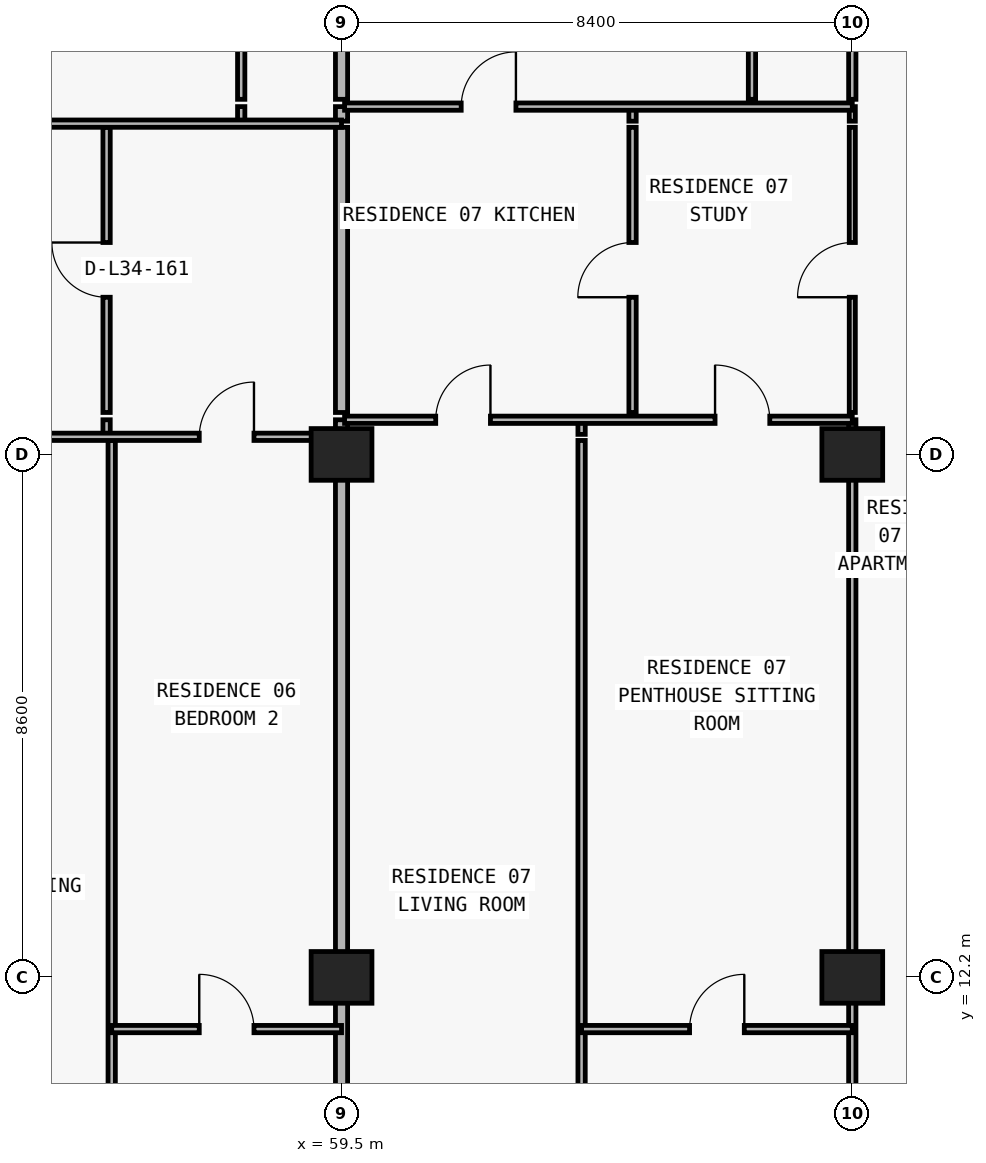
"""IFC4 building model, lengths in metres.
Left out: names, types, materials, properties, quantities, classifications, styles, units other than length and angle.
Written with IfcOpenShell. Run it as: python <this file> out.ifc"""

import sys

from ifc_helpers import new_model, si_unit, direction, frame, frame_2d, origin, origin_2d, place, context, subcontext, project, spatial, rectangle, extrude, element, fill, save


model = new_model("IFC4")
c1 = context("Model", 3, precision=1e-05, world=origin(), true_north=direction((0.0, 1.0)))
c2 = subcontext(c1, "Body", "Model", "MODEL_VIEW")
j1 = project(units=[si_unit("LENGTHUNIT", "METRE"), si_unit("PLANEANGLEUNIT", "RADIAN")], contexts=[c1])
p1 = place(None, origin())
s1 = spatial("IfcSite", under=j1, at=p1, CompositionType="ELEMENT")
p2 = place(p1, origin())
s2 = spatial("IfcBuilding", under=s1, at=p2, CompositionType="ELEMENT")
p3 = place(p2, frame((0.0, 0.0, 125.7)))
s3 = spatial("IfcBuildingStorey", under=s2, at=p3, CompositionType="ELEMENT", Elevation=125.7)
for number, where, z_axis, x_axis in (
    (1, (59.5, 12.2, 0.0), (0.0, 0.0, 1.0), (1.0, 0.0, 0.0)),
    (2, (67.9, 12.2, 0.0), (0.0, 0.0, 1.0), (1.0, 0.0, 0.0)),
    (3, (59.5, 20.8, 0.0), (0.0, 0.0, 1.0), (1.0, 0.0, 0.0)),
    (4, (67.9, 20.8, 0.0), (0.0, 0.0, 1.0), (1.0, 0.0, 0.0)),
):
    element("IfcColumn", number, at=place(p3, frame(where, z_axis=z_axis, x_axis=x_axis)), inside=s3, PredefinedType="COLUMN", context=c2, shape_type="SweptSolid", body=[
        extrude(rectangle(XDim=1.0, YDim=0.85, at=origin_2d()), origin(), (0.0, 0.0, 1.0), 3.05),
    ])
p4 = place(p3, frame((55.636, 21.13, 0.0), z_axis=(0.0, 0.0, 1.0), x_axis=(0.0, 1.0, 0.0)))
e5 = element("IfcWall", 5, at=p4, inside=s3, PredefinedType="PARTITIONING", context=c2, shape_type="SweptSolid", body=[
    extrude(rectangle(XDim=0.24, YDim=0.12, at=frame_2d((0.12, 0.0))), origin(), (0.0, 0.0, 1.0), 3.05),
])
p5 = place(p3, frame((55.636, 21.49, 0.0), z_axis=(0.0, 0.0, 1.0), x_axis=(0.0, 1.0, 0.0)))
e6 = element("IfcWall", 6, at=p5, inside=s3, PredefinedType="PARTITIONING", context=c2, shape_type="SweptSolid", body=[
    extrude(rectangle(XDim=4.69, YDim=0.12, at=frame_2d((2.345, 0.0))), origin(), (0.0, 0.0, 1.0), 3.05),
])
p6 = place(p5, frame((1.895, 0.0, 0.0)))
e7 = element("IfcOpeningElement", 7, at=p6, cuts=e6, PredefinedType="OPENING", context=c2, shape_type="SweptSolid", body=[
    extrude(rectangle(XDim=0.9, YDim=2.15, at=frame_2d((0.45, 1.075))), frame((0.0, 0.07, 0.0), z_axis=(0.0, -1.0, 0.0), x_axis=(1.0, 0.0, 0.0)), (0.0, 0.0, 1.0), 0.14),
])
p7 = place(p3, frame((55.72, 8.84, 0.0), z_axis=(0.0, 0.0, 1.0), x_axis=(0.0, 1.0, 0.0)))
e8 = element("IfcWall", 8, at=p7, inside=s3, PredefinedType="PARTITIONING", context=c2, shape_type="SweptSolid", body=[
    extrude(rectangle(XDim=12.19, YDim=0.12, at=frame_2d((6.095, 0.0))), origin(), (0.0, 0.0, 1.0), 3.05),
])
p8 = place(p3, frame((57.85, 26.28, 0.0), z_axis=(0.0, 0.0, 1.0), x_axis=(0.0, 1.0, 0.0)))
e9 = element("IfcWall", 9, at=p8, inside=s3, PredefinedType="PARTITIONING", context=c2, shape_type="SweptSolid", body=[
    extrude(rectangle(XDim=0.24, YDim=0.12, at=frame_2d((0.12, 0.0))), origin(), (0.0, 0.0, 1.0), 3.05),
])
p9 = place(p3, frame((57.85, 26.64, 0.0), z_axis=(0.0, 0.0, 1.0), x_axis=(0.0, 1.0, 0.0)))
e10 = element("IfcWall", 10, at=p9, inside=s3, PredefinedType="PARTITIONING", context=c2, shape_type="SweptSolid", body=[
    extrude(rectangle(XDim=8.06, YDim=0.12, at=frame_2d((4.03, 0.0))), origin(), (0.0, 0.0, 1.0), 3.05),
])
p10 = place(p9, frame((3.755, 0.0, 0.0)))
e11 = element("IfcOpeningElement", 11, at=p10, cuts=e10, PredefinedType="OPENING", context=c2, shape_type="SweptSolid", body=[
    extrude(rectangle(XDim=0.85, YDim=2.1, at=frame_2d((0.425, 1.05))), frame((0.0, 0.07, 0.0), z_axis=(0.0, -1.0, 0.0), x_axis=(1.0, 0.0, 0.0)), (0.0, 0.0, 1.0), 0.14),
])
p11 = place(p3, frame((59.5, 8.84, 0.0), z_axis=(0.0, 0.0, 1.0), x_axis=(0.0, 1.0, 0.0)))
e12 = element("IfcWall", 12, at=p11, inside=s3, PredefinedType="PARTITIONING", context=c2, shape_type="SweptSolid", body=[
    extrude(rectangle(XDim=12.19, YDim=0.2, at=frame_2d((6.095, 0.0))), origin(), (0.0, 0.0, 1.0), 2.174),
])
p12 = place(p3, frame((59.5, 21.13, 0.0), z_axis=(0.0, 0.0, 1.0), x_axis=(0.0, 1.0, 0.0)))
e13 = element("IfcWall", 13, at=p12, inside=s3, PredefinedType="PARTITIONING", context=c2, shape_type="SweptSolid", body=[
    extrude(rectangle(XDim=0.24, YDim=0.2, at=frame_2d((0.12, 0.0))), origin(), (0.0, 0.0, 1.0), 2.174),
])
p13 = place(p3, frame((59.5, 21.49, 0.0), z_axis=(0.0, 0.0, 1.0), x_axis=(0.0, 1.0, 0.0)))
e14 = element("IfcWall", 14, at=p13, inside=s3, PredefinedType="PARTITIONING", context=c2, shape_type="SweptSolid", body=[
    extrude(rectangle(XDim=4.69, YDim=0.2, at=frame_2d((2.345, 0.0))), origin(), (0.0, 0.0, 1.0), 2.174),
])
p14 = place(p3, frame((59.5, 26.28, 0.0), z_axis=(0.0, 0.0, 1.0), x_axis=(0.0, 1.0, 0.0)))
e15 = element("IfcWall", 15, at=p14, inside=s3, PredefinedType="PARTITIONING", context=c2, shape_type="SweptSolid", body=[
    extrude(rectangle(XDim=0.24, YDim=0.2, at=frame_2d((0.12, 0.0))), origin(), (0.0, 0.0, 1.0), 2.174),
])
p15 = place(p3, frame((59.5, 26.64, 0.0), z_axis=(0.0, 0.0, 1.0), x_axis=(0.0, 1.0, 0.0)))
e16 = element("IfcWall", 16, at=p15, inside=s3, PredefinedType="PARTITIONING", context=c2, shape_type="SweptSolid", body=[
    extrude(rectangle(XDim=8.06, YDim=0.2, at=frame_2d((4.03, 0.0))), origin(), (0.0, 0.0, 1.0), 2.174),
])
p16 = place(p3, frame((63.448, 8.84, 0.0), z_axis=(0.0, 0.0, 1.0), x_axis=(0.0, 1.0, 0.0)))
e17 = element("IfcWall", 17, at=p16, inside=s3, PredefinedType="PARTITIONING", context=c2, shape_type="SweptSolid", body=[
    extrude(rectangle(XDim=12.19, YDim=0.12, at=frame_2d((6.095, 0.0))), origin(), (0.0, 0.0, 1.0), 3.05),
])
p17 = place(p3, frame((63.448, 21.13, 0.0), z_axis=(0.0, 0.0, 1.0), x_axis=(0.0, 1.0, 0.0)))
e18 = element("IfcWall", 18, at=p17, inside=s3, PredefinedType="PARTITIONING", context=c2, shape_type="SweptSolid", body=[
    extrude(rectangle(XDim=0.24, YDim=0.12, at=frame_2d((0.12, 0.0))), origin(), (0.0, 0.0, 1.0), 3.05),
])
p18 = place(p3, frame((64.286, 21.49, 0.0), z_axis=(0.0, 0.0, 1.0), x_axis=(0.0, 1.0, 0.0)))
e19 = element("IfcWall", 19, at=p18, inside=s3, PredefinedType="PARTITIONING", context=c2, shape_type="SweptSolid", body=[
    extrude(rectangle(XDim=4.69, YDim=0.12, at=frame_2d((2.345, 0.0))), origin(), (0.0, 0.0, 1.0), 3.05),
])
p19 = place(p18, frame((1.895, 0.0, 0.0)))
e20 = element("IfcOpeningElement", 20, at=p19, cuts=e19, PredefinedType="OPENING", context=c2, shape_type="SweptSolid", body=[
    extrude(rectangle(XDim=0.9, YDim=2.15, at=frame_2d((0.45, 1.075))), frame((0.0, 0.07, 0.0), z_axis=(0.0, -1.0, 0.0), x_axis=(1.0, 0.0, 0.0)), (0.0, 0.0, 1.0), 0.14),
])
p20 = place(p3, frame((64.286, 26.28, 0.0), z_axis=(0.0, 0.0, 1.0), x_axis=(0.0, 1.0, 0.0)))
e21 = element("IfcWall", 21, at=p20, inside=s3, PredefinedType="PARTITIONING", context=c2, shape_type="SweptSolid", body=[
    extrude(rectangle(XDim=0.24, YDim=0.12, at=frame_2d((0.12, 0.0))), origin(), (0.0, 0.0, 1.0), 3.05),
])
p21 = place(p3, frame((66.25, 26.64, 0.0), z_axis=(0.0, 0.0, 1.0), x_axis=(0.0, 1.0, 0.0)))
e22 = element("IfcWall", 22, at=p21, inside=s3, PredefinedType="PARTITIONING", context=c2, shape_type="SweptSolid", body=[
    extrude(rectangle(XDim=8.06, YDim=0.12, at=frame_2d((4.03, 0.0))), origin(), (0.0, 0.0, 1.0), 3.05),
])
p22 = place(p21, frame((3.755, 0.0, 0.0)))
e23 = element("IfcOpeningElement", 23, at=p22, cuts=e22, PredefinedType="OPENING", context=c2, shape_type="SweptSolid", body=[
    extrude(rectangle(XDim=0.85, YDim=2.1, at=frame_2d((0.425, 1.05))), frame((0.0, 0.07, 0.0), z_axis=(0.0, -1.0, 0.0), x_axis=(1.0, 0.0, 0.0)), (0.0, 0.0, 1.0), 0.14),
])
p23 = place(p3, frame((67.9, 8.84, 0.0), z_axis=(0.0, 0.0, 1.0), x_axis=(0.0, 1.0, 0.0)))
e24 = element("IfcWall", 24, at=p23, inside=s3, PredefinedType="PARTITIONING", context=c2, shape_type="SweptSolid", body=[
    extrude(rectangle(XDim=12.19, YDim=0.12, at=frame_2d((6.095, 0.0))), origin(), (0.0, 0.0, 1.0), 2.174),
])
p24 = place(p3, frame((67.9, 21.13, 0.0), z_axis=(0.0, 0.0, 1.0), x_axis=(0.0, 1.0, 0.0)))
e25 = element("IfcWall", 25, at=p24, inside=s3, PredefinedType="PARTITIONING", context=c2, shape_type="SweptSolid", body=[
    extrude(rectangle(XDim=0.24, YDim=0.12, at=frame_2d((0.12, 0.0))), origin(), (0.0, 0.0, 1.0), 2.174),
])
p25 = place(p3, frame((67.9, 21.49, 0.0), z_axis=(0.0, 0.0, 1.0), x_axis=(0.0, 1.0, 0.0)))
e26 = element("IfcWall", 26, at=p25, inside=s3, PredefinedType="MOVABLE", context=c2, shape_type="SweptSolid", body=[
    extrude(rectangle(XDim=4.69, YDim=0.1, at=frame_2d((2.345, 0.0))), origin(), (0.0, 0.0, 1.0), 2.174),
])
p26 = place(p25, frame((1.895, 0.0, 0.0)))
e27 = element("IfcOpeningElement", 27, at=p26, cuts=e26, PredefinedType="OPENING", context=c2, shape_type="SweptSolid", body=[
    extrude(rectangle(XDim=0.9, YDim=2.124, at=frame_2d((0.45, 1.062))), frame((0.0, 0.06, 0.0), z_axis=(0.0, -1.0, 0.0), x_axis=(1.0, 0.0, 0.0)), (0.0, 0.0, 1.0), 0.12),
])
p27 = place(p3, frame((67.9, 26.28, 0.0), z_axis=(0.0, 0.0, 1.0), x_axis=(0.0, 1.0, 0.0)))
e28 = element("IfcWall", 28, at=p27, inside=s3, PredefinedType="MOVABLE", context=c2, shape_type="SweptSolid", body=[
    extrude(rectangle(XDim=0.24, YDim=0.1, at=frame_2d((0.12, 0.0))), origin(), (0.0, 0.0, 1.0), 2.174),
])
p28 = place(p3, frame((67.9, 26.64, 0.0), z_axis=(0.0, 0.0, 1.0), x_axis=(0.0, 1.0, 0.0)))
e29 = element("IfcWall", 29, at=p28, inside=s3, PredefinedType="PARTITIONING", context=c2, shape_type="SweptSolid", body=[
    extrude(rectangle(XDim=8.06, YDim=0.12, at=frame_2d((4.03, 0.0))), origin(), (0.0, 0.0, 1.0), 2.174),
])
p29 = place(p3, frame((55.72, 11.35, 0.0), z_axis=(0.0, 0.0, 1.0), x_axis=(1.0, 0.0, 0.0)))
e30 = element("IfcWall", 30, at=p29, inside=s3, PredefinedType="PARTITIONING", context=c2, shape_type="SweptSolid", body=[
    extrude(rectangle(XDim=3.78, YDim=0.12, at=frame_2d((1.89, 0.0))), origin(), (0.0, 0.0, 1.0), 3.05),
])
p30 = place(p29, frame((1.44, 0.0, 0.0)))
e31 = element("IfcOpeningElement", 31, at=p30, cuts=e30, PredefinedType="OPENING", context=c2, shape_type="SweptSolid", body=[
    extrude(rectangle(XDim=0.9, YDim=2.15, at=frame_2d((0.45, 1.075))), frame((0.0, 0.07, 0.0), z_axis=(0.0, -1.0, 0.0), x_axis=(1.0, 0.0, 0.0)), (0.0, 0.0, 1.0), 0.14),
])
p31 = place(p3, frame((63.448, 11.35, 0.0), z_axis=(0.0, 0.0, 1.0), x_axis=(1.0, 0.0, 0.0)))
e32 = element("IfcWall", 32, at=p31, inside=s3, PredefinedType="PARTITIONING", context=c2, shape_type="SweptSolid", body=[
    extrude(rectangle(XDim=4.452, YDim=0.12, at=frame_2d((2.226, 0.0))), origin(), (0.0, 0.0, 1.0), 3.05),
])
p32 = place(p31, frame((1.776, 0.0, 0.0)))
e33 = element("IfcOpeningElement", 33, at=p32, cuts=e32, PredefinedType="OPENING", context=c2, shape_type="SweptSolid", body=[
    extrude(rectangle(XDim=0.9, YDim=2.15, at=frame_2d((0.45, 1.075))), frame((0.0, 0.07, 0.0), z_axis=(0.0, -1.0, 0.0), x_axis=(1.0, 0.0, 0.0)), (0.0, 0.0, 1.0), 0.14),
])
p33 = place(p3, frame((51.32, 21.09, 0.0), z_axis=(0.0, 0.0, 1.0), x_axis=(1.0, 0.0, 0.0)))
e34 = element("IfcWall", 34, at=p33, inside=s3, PredefinedType="PARTITIONING", context=c2, shape_type="SweptSolid", body=[
    extrude(rectangle(XDim=8.18, YDim=0.12, at=frame_2d((4.09, 0.0))), origin(), (0.0, 0.0, 1.0), 2.174),
])
p34 = place(p33, frame((1.708, 0.0, 0.0)))
e35 = element("IfcOpeningElement", 35, at=p34, cuts=e34, PredefinedType="OPENING", context=c2, shape_type="SweptSolid", body=[
    extrude(rectangle(XDim=0.9, YDim=2.124, at=frame_2d((0.45, 1.062))), frame((0.0, 0.07, 0.0), z_axis=(0.0, -1.0, 0.0), x_axis=(1.0, 0.0, 0.0)), (0.0, 0.0, 1.0), 0.14),
])
p35 = place(p33, frame((5.84, 0.0, 0.0)))
e36 = element("IfcOpeningElement", 36, at=p35, cuts=e34, PredefinedType="OPENING", context=c2, shape_type="SweptSolid", body=[
    extrude(rectangle(XDim=0.9, YDim=2.124, at=frame_2d((0.45, 1.062))), frame((0.0, 0.07, 0.0), z_axis=(0.0, -1.0, 0.0), x_axis=(1.0, 0.0, 0.0)), (0.0, 0.0, 1.0), 0.14),
])
p36 = place(p3, frame((59.55, 21.37, 0.0), z_axis=(0.0, 0.0, 1.0), x_axis=(1.0, 0.0, 0.0)))
e37 = element("IfcWall", 37, at=p36, inside=s3, PredefinedType="PARTITIONING", context=c2, shape_type="SweptSolid", body=[
    extrude(rectangle(XDim=8.35, YDim=0.12, at=frame_2d((4.175, 0.0))), origin(), (0.0, 0.0, 1.0), 3.05),
])
p37 = place(p36, frame((1.499, 0.0, 0.0)))
e38 = element("IfcOpeningElement", 38, at=p37, cuts=e37, PredefinedType="OPENING", context=c2, shape_type="SweptSolid", body=[
    extrude(rectangle(XDim=0.9, YDim=2.15, at=frame_2d((0.45, 1.075))), frame((0.0, 0.07, 0.0), z_axis=(0.0, -1.0, 0.0), x_axis=(1.0, 0.0, 0.0)), (0.0, 0.0, 1.0), 0.14),
])
p38 = place(p36, frame((6.093, 0.0, 0.0)))
e39 = element("IfcOpeningElement", 39, at=p38, cuts=e37, PredefinedType="OPENING", context=c2, shape_type="SweptSolid", body=[
    extrude(rectangle(XDim=0.9, YDim=2.15, at=frame_2d((0.45, 1.075))), frame((0.0, 0.07, 0.0), z_axis=(0.0, -1.0, 0.0), x_axis=(1.0, 0.0, 0.0)), (0.0, 0.0, 1.0), 0.14),
])
p39 = place(p3, frame((51.32, 26.24, 0.0), z_axis=(0.0, 0.0, 1.0), x_axis=(1.0, 0.0, 0.0)))
e40 = element("IfcWall", 40, at=p39, inside=s3, PredefinedType="PARTITIONING", context=c2, shape_type="SweptSolid", body=[
    extrude(rectangle(XDim=8.18, YDim=0.12, at=frame_2d((4.09, 0.0))), origin(), (0.0, 0.0, 1.0), 3.05),
])
p40 = place(p39, frame((1.708, 0.0, 0.0)))
e41 = element("IfcOpeningElement", 41, at=p40, cuts=e40, PredefinedType="OPENING", context=c2, shape_type="SweptSolid", body=[
    extrude(rectangle(XDim=0.9, YDim=2.15, at=frame_2d((0.45, 1.075))), frame((0.0, 0.07, 0.0), z_axis=(0.0, -1.0, 0.0), x_axis=(1.0, 0.0, 0.0)), (0.0, 0.0, 1.0), 0.14),
])
p41 = place(p3, frame((59.55, 26.52, 0.0), z_axis=(0.0, 0.0, 1.0), x_axis=(1.0, 0.0, 0.0)))
e42 = element("IfcWall", 42, at=p41, inside=s3, PredefinedType="PARTITIONING", context=c2, shape_type="SweptSolid", body=[
    extrude(rectangle(XDim=8.35, YDim=0.12, at=frame_2d((4.175, 0.0))), origin(), (0.0, 0.0, 1.0), 3.05),
])
p42 = place(p41, frame((1.918, 0.0, 0.0)))
e43 = element("IfcOpeningElement", 43, at=p42, cuts=e42, PredefinedType="OPENING", context=c2, shape_type="SweptSolid", body=[
    extrude(rectangle(XDim=0.9, YDim=2.15, at=frame_2d((0.45, 1.075))), frame((0.0, 0.07, 0.0), z_axis=(0.0, -1.0, 0.0), x_axis=(1.0, 0.0, 0.0)), (0.0, 0.0, 1.0), 0.14),
])
p43 = place(p6, origin())
e44 = element("IfcDoor", 44, at=p43, inside=s3, OperationType="SINGLE_SWING_RIGHT", PredefinedType="DOOR", context=c2, shape_type="SweptSolid", body=[
    extrude(rectangle(XDim=0.9, YDim=2.15, at=frame_2d((0.45, 1.075))), frame((0.0, 0.025, 0.0), z_axis=(0.0, -1.0, 0.0), x_axis=(1.0, 0.0, 0.0)), (0.0, 0.0, 1.0), 0.05),
])
fill(e7, e44)
p44 = place(p35, origin())
e45 = element("IfcDoor", 45, at=p44, inside=s3, OperationType="SINGLE_SWING_RIGHT", PredefinedType="DOOR", context=c2, shape_type="SweptSolid", body=[
    extrude(rectangle(XDim=0.9, YDim=2.124, at=frame_2d((0.45, 1.062))), frame((0.0, 0.025, 0.0), z_axis=(0.0, -1.0, 0.0), x_axis=(1.0, 0.0, 0.0)), (0.0, 0.0, 1.0), 0.05),
])
fill(e36, e45)
p45 = place(p30, origin())
e46 = element("IfcDoor", 46, at=p45, inside=s3, OperationType="SINGLE_SWING_LEFT", PredefinedType="DOOR", context=c2, shape_type="SweptSolid", body=[
    extrude(rectangle(XDim=0.9, YDim=2.15, at=frame_2d((0.45, 1.075))), frame((0.0, 0.025, 0.0), z_axis=(0.0, -1.0, 0.0), x_axis=(1.0, 0.0, 0.0)), (0.0, 0.0, 1.0), 0.05),
])
fill(e31, e46)
p46 = place(p42, origin())
e47 = element("IfcDoor", 47, at=p46, inside=s3, OperationType="SINGLE_SWING_RIGHT", PredefinedType="DOOR", context=c2, shape_type="SweptSolid", body=[
    extrude(rectangle(XDim=0.9, YDim=2.15, at=frame_2d((0.45, 1.075))), frame((0.0, 0.025, 0.0), z_axis=(0.0, -1.0, 0.0), x_axis=(1.0, 0.0, 0.0)), (0.0, 0.0, 1.0), 0.05),
])
fill(e43, e47)
p47 = place(p19, origin())
e48 = element("IfcDoor", 48, at=p47, inside=s3, OperationType="SINGLE_SWING_LEFT", PredefinedType="DOOR", context=c2, shape_type="SweptSolid", body=[
    extrude(rectangle(XDim=0.9, YDim=2.15, at=frame_2d((0.45, 1.075))), frame((0.0, 0.025, 0.0), z_axis=(0.0, -1.0, 0.0), x_axis=(1.0, 0.0, 0.0)), (0.0, 0.0, 1.0), 0.05),
])
fill(e20, e48)
p48 = place(p37, origin())
e49 = element("IfcDoor", 49, at=p48, inside=s3, OperationType="SINGLE_SWING_RIGHT", PredefinedType="DOOR", context=c2, shape_type="SweptSolid", body=[
    extrude(rectangle(XDim=0.9, YDim=2.15, at=frame_2d((0.45, 1.075))), frame((0.0, 0.025, 0.0), z_axis=(0.0, -1.0, 0.0), x_axis=(1.0, 0.0, 0.0)), (0.0, 0.0, 1.0), 0.05),
])
fill(e38, e49)
p49 = place(p38, origin())
e50 = element("IfcDoor", 50, at=p49, inside=s3, OperationType="SINGLE_SWING_LEFT", PredefinedType="DOOR", context=c2, shape_type="SweptSolid", body=[
    extrude(rectangle(XDim=0.9, YDim=2.15, at=frame_2d((0.45, 1.075))), frame((0.0, 0.025, 0.0), z_axis=(0.0, -1.0, 0.0), x_axis=(1.0, 0.0, 0.0)), (0.0, 0.0, 1.0), 0.05),
])
fill(e39, e50)
p50 = place(p32, origin())
e51 = element("IfcDoor", 51, at=p50, inside=s3, OperationType="SINGLE_SWING_RIGHT", PredefinedType="DOOR", context=c2, shape_type="SweptSolid", body=[
    extrude(rectangle(XDim=0.9, YDim=2.15, at=frame_2d((0.45, 1.075))), frame((0.0, 0.025, 0.0), z_axis=(0.0, -1.0, 0.0), x_axis=(1.0, 0.0, 0.0)), (0.0, 0.0, 1.0), 0.05),
])
fill(e33, e51)
p51 = place(p26, origin())
e52 = element("IfcDoor", 52, at=p51, inside=s3, OperationType="SINGLE_SWING_LEFT", PredefinedType="DOOR", context=c2, shape_type="SweptSolid", body=[
    extrude(rectangle(XDim=0.9, YDim=2.124, at=frame_2d((0.45, 1.062))), frame((0.0, 0.025, 0.0), z_axis=(0.0, -1.0, 0.0), x_axis=(1.0, 0.0, 0.0)), (0.0, 0.0, 1.0), 0.05),
])
fill(e27, e52)
save(model, sys.argv[1])
